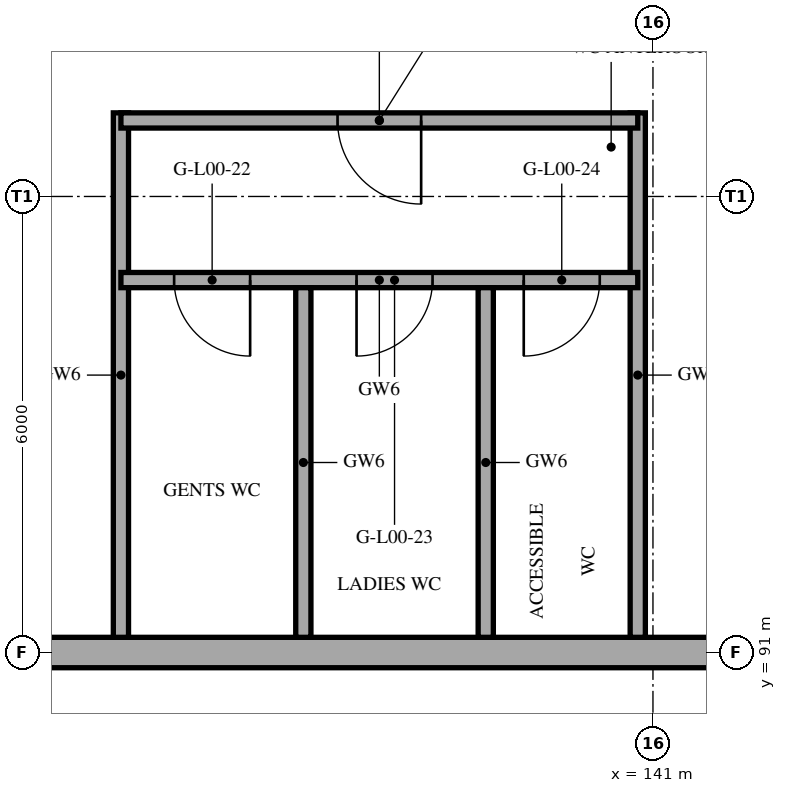
"""IFC4 building model, lengths in metres.
Left out: names, types, materials, properties, quantities, classifications, styles, units other than length and angle.
Written with IfcOpenShell. Run it as: python <this file> out.ifc"""

import sys

from ifc_helpers import new_model, si_unit, direction, frame, frame_2d, origin, place, context, subcontext, project, spatial, rectangle, extrude, element, fill, save


model = new_model("IFC4")
c1 = context("Model", 3, precision=1e-05, world=origin(), true_north=direction((0.0, 1.0)))
c2 = subcontext(c1, "Body", "Model", "MODEL_VIEW")
j1 = project(units=[si_unit("LENGTHUNIT", "METRE"), si_unit("PLANEANGLEUNIT", "RADIAN")], contexts=[c1])
p1 = place(None, origin())
s1 = spatial("IfcSite", under=j1, at=p1, CompositionType="ELEMENT")
p2 = place(p1, origin())
s2 = spatial("IfcBuilding", under=s1, at=p2, CompositionType="ELEMENT")
p3 = place(p2, origin())
s3 = spatial("IfcBuildingStorey", under=s2, at=p3, CompositionType="ELEMENT", Elevation=0.0)
p4 = place(p3, frame((107.6, 91.0, 0.0), z_axis=(0.0, 0.0, 1.0), x_axis=(1.0, 0.0, 0.0)))
e1 = element("IfcWall", 1, at=p4, inside=s3, PredefinedType="SHEAR", context=c2, shape_type="SweptSolid", body=[
    extrude(rectangle(XDim=41.6, YDim=0.4, at=frame_2d((20.8, 0.0))), origin(), (0.0, 0.0, 1.0), 5.0),
])
p5 = place(p4, frame((2.5, 0.0, 0.0)))
e2 = element("IfcOpeningElement", 2, at=p5, cuts=e1, PredefinedType="OPENING", context=c2, shape_type="SweptSolid", body=[
    extrude(rectangle(XDim=1.8, YDim=2.1, at=frame_2d((0.9, 1.05))), frame((0.0, 0.21, 0.0), z_axis=(0.0, -1.0, 0.0), x_axis=(1.0, 0.0, 0.0)), (0.0, 0.0, 1.0), 0.42),
])
p6 = place(p4, frame((10.0, 0.0, 0.0)))
e3 = element("IfcOpeningElement", 3, at=p6, cuts=e1, PredefinedType="OPENING", context=c2, shape_type="SweptSolid", body=[
    extrude(rectangle(XDim=1.8, YDim=2.1, at=frame_2d((0.9, 1.05))), frame((0.0, 0.21, 0.0), z_axis=(0.0, -1.0, 0.0), x_axis=(1.0, 0.0, 0.0)), (0.0, 0.0, 1.0), 0.42),
])
p7 = place(p4, frame((35.5, 0.0, 0.0)))
e4 = element("IfcOpeningElement", 4, at=p7, cuts=e1, PredefinedType="OPENING", context=c2, shape_type="SweptSolid", body=[
    extrude(rectangle(XDim=1.8, YDim=2.1, at=frame_2d((0.9, 1.05))), frame((0.0, 0.21, 0.0), z_axis=(0.0, -1.0, 0.0), x_axis=(1.0, 0.0, 0.0)), (0.0, 0.0, 1.0), 0.42),
])
p8 = place(p4, frame((38.5, 0.0, 0.0)))
e5 = element("IfcOpeningElement", 5, at=p8, cuts=e1, PredefinedType="OPENING", context=c2, shape_type="SweptSolid", body=[
    extrude(rectangle(XDim=1.8, YDim=2.1, at=frame_2d((0.9, 1.05))), frame((0.0, 0.21, 0.0), z_axis=(0.0, -1.0, 0.0), x_axis=(1.0, 0.0, 0.0)), (0.0, 0.0, 1.0), 0.42),
])
for number, where, z_axis, x_axis in (
    (6, (134.0, 91.2, 0.0), (0.0, 0.0, 1.0), (0.0, 1.0, 0.0)),
    (7, (140.8, 91.2, 0.0), (0.0, 0.0, 1.0), (0.0, 1.0, 0.0)),
):
    element("IfcWall", number, at=place(p3, frame(where, z_axis=z_axis, x_axis=x_axis)), inside=s3, PredefinedType="PARTITIONING", context=c2, shape_type="SweptSolid", body=[
        extrude(rectangle(XDim=6.9, YDim=0.2, at=frame_2d((3.45, 0.0))), origin(), (0.0, 0.0, 1.0), 4.7),
    ])
p9 = place(p3, frame((134.0, 98.0, 0.0), z_axis=(0.0, 0.0, 1.0), x_axis=(1.0, 0.0, 0.0)))
e8 = element("IfcWall", 8, at=p9, inside=s3, PredefinedType="PARTITIONING", context=c2, shape_type="SweptSolid", body=[
    extrude(rectangle(XDim=6.8, YDim=0.2, at=frame_2d((3.4, 0.0))), origin(), (0.0, 0.0, 1.0), 4.7),
])
p10 = place(p9, frame((2.85, 0.0, 0.0)))
e9 = element("IfcOpeningElement", 9, at=p10, cuts=e8, PredefinedType="OPENING", context=c2, shape_type="SweptSolid", body=[
    extrude(rectangle(XDim=1.1, YDim=2.1, at=frame_2d((0.55, 1.05))), frame((0.0, 0.11, 0.0), z_axis=(0.0, -1.0, 0.0), x_axis=(1.0, 0.0, 0.0)), (0.0, 0.0, 1.0), 0.22),
])
p11 = place(p3, frame((134.0, 95.9, 0.0), z_axis=(0.0, 0.0, 1.0), x_axis=(1.0, 0.0, 0.0)))
e10 = element("IfcWall", 10, at=p11, inside=s3, PredefinedType="PARTITIONING", context=c2, shape_type="SweptSolid", body=[
    extrude(rectangle(XDim=6.8, YDim=0.2, at=frame_2d((3.4, 0.0))), origin(), (0.0, 0.0, 1.0), 4.7),
])
p12 = place(p11, frame((0.7, 0.0, 0.0)))
e11 = element("IfcOpeningElement", 11, at=p12, cuts=e10, PredefinedType="OPENING", context=c2, shape_type="SweptSolid", body=[
    extrude(rectangle(XDim=1.0, YDim=2.1, at=frame_2d((0.5, 1.05))), frame((0.0, 0.11, 0.0), z_axis=(0.0, -1.0, 0.0), x_axis=(1.0, 0.0, 0.0)), (0.0, 0.0, 1.0), 0.22),
])
p13 = place(p11, frame((3.1, 0.0, 0.0)))
e12 = element("IfcOpeningElement", 12, at=p13, cuts=e10, PredefinedType="OPENING", context=c2, shape_type="SweptSolid", body=[
    extrude(rectangle(XDim=1.0, YDim=2.1, at=frame_2d((0.5, 1.05))), frame((0.0, 0.11, 0.0), z_axis=(0.0, -1.0, 0.0), x_axis=(1.0, 0.0, 0.0)), (0.0, 0.0, 1.0), 0.22),
])
p14 = place(p11, frame((5.3, 0.0, 0.0)))
e13 = element("IfcOpeningElement", 13, at=p14, cuts=e10, PredefinedType="OPENING", context=c2, shape_type="SweptSolid", body=[
    extrude(rectangle(XDim=1.0, YDim=2.1, at=frame_2d((0.5, 1.05))), frame((0.0, 0.11, 0.0), z_axis=(0.0, -1.0, 0.0), x_axis=(1.0, 0.0, 0.0)), (0.0, 0.0, 1.0), 0.22),
])
for number, where, z_axis, x_axis in (
    (14, (136.4, 91.2, 0.0), (0.0, 0.0, 1.0), (0.0, 1.0, 0.0)),
    (15, (138.8, 91.2, 0.0), (0.0, 0.0, 1.0), (0.0, 1.0, 0.0)),
):
    element("IfcWall", number, at=place(p3, frame(where, z_axis=z_axis, x_axis=x_axis)), inside=s3, PredefinedType="PARTITIONING", context=c2, shape_type="SweptSolid", body=[
        extrude(rectangle(XDim=4.6, YDim=0.2, at=frame_2d((2.3, 0.0))), origin(), (0.0, 0.0, 1.0), 4.7),
    ])
p15 = place(p10, frame((1.1, 0.0, 0.0), z_axis=(0.0, 0.0, 1.0), x_axis=(-1.0, 0.0, 0.0)))
e16 = element("IfcDoor", 16, at=p15, inside=s3, OperationType="SINGLE_SWING_LEFT", PredefinedType="DOOR", context=c2, shape_type="SweptSolid", body=[
    extrude(rectangle(XDim=1.1, YDim=2.1, at=frame_2d((0.55, 1.05))), frame((0.0, 0.025, 0.0), z_axis=(0.0, -1.0, 0.0), x_axis=(1.0, 0.0, 0.0)), (0.0, 0.0, 1.0), 0.05),
])
fill(e9, e16)
p16 = place(p12, frame((1.0, 0.0, 0.0), z_axis=(0.0, 0.0, 1.0), x_axis=(-1.0, 0.0, 0.0)))
e17 = element("IfcDoor", 17, at=p16, inside=s3, OperationType="SINGLE_SWING_LEFT", PredefinedType="DOOR", context=c2, shape_type="SweptSolid", body=[
    extrude(rectangle(XDim=1.0, YDim=2.1, at=frame_2d((0.5, 1.05))), frame((0.0, 0.025, 0.0), z_axis=(0.0, -1.0, 0.0), x_axis=(1.0, 0.0, 0.0)), (0.0, 0.0, 1.0), 0.05),
])
fill(e11, e17)
p17 = place(p13, frame((1.0, 0.0, 0.0), z_axis=(0.0, 0.0, 1.0), x_axis=(-1.0, 0.0, 0.0)))
e18 = element("IfcDoor", 18, at=p17, inside=s3, OperationType="SINGLE_SWING_RIGHT", PredefinedType="DOOR", context=c2, shape_type="SweptSolid", body=[
    extrude(rectangle(XDim=1.0, YDim=2.1, at=frame_2d((0.5, 1.05))), frame((0.0, 0.025, 0.0), z_axis=(0.0, -1.0, 0.0), x_axis=(1.0, 0.0, 0.0)), (0.0, 0.0, 1.0), 0.05),
])
fill(e12, e18)
p18 = place(p14, frame((1.0, 0.0, 0.0), z_axis=(0.0, 0.0, 1.0), x_axis=(-1.0, 0.0, 0.0)))
e19 = element("IfcDoor", 19, at=p18, inside=s3, OperationType="SINGLE_SWING_RIGHT", PredefinedType="DOOR", context=c2, shape_type="SweptSolid", body=[
    extrude(rectangle(XDim=1.0, YDim=2.1, at=frame_2d((0.5, 1.05))), frame((0.0, 0.025, 0.0), z_axis=(0.0, -1.0, 0.0), x_axis=(1.0, 0.0, 0.0)), (0.0, 0.0, 1.0), 0.05),
])
fill(e13, e19)
save(model, sys.argv[1])
